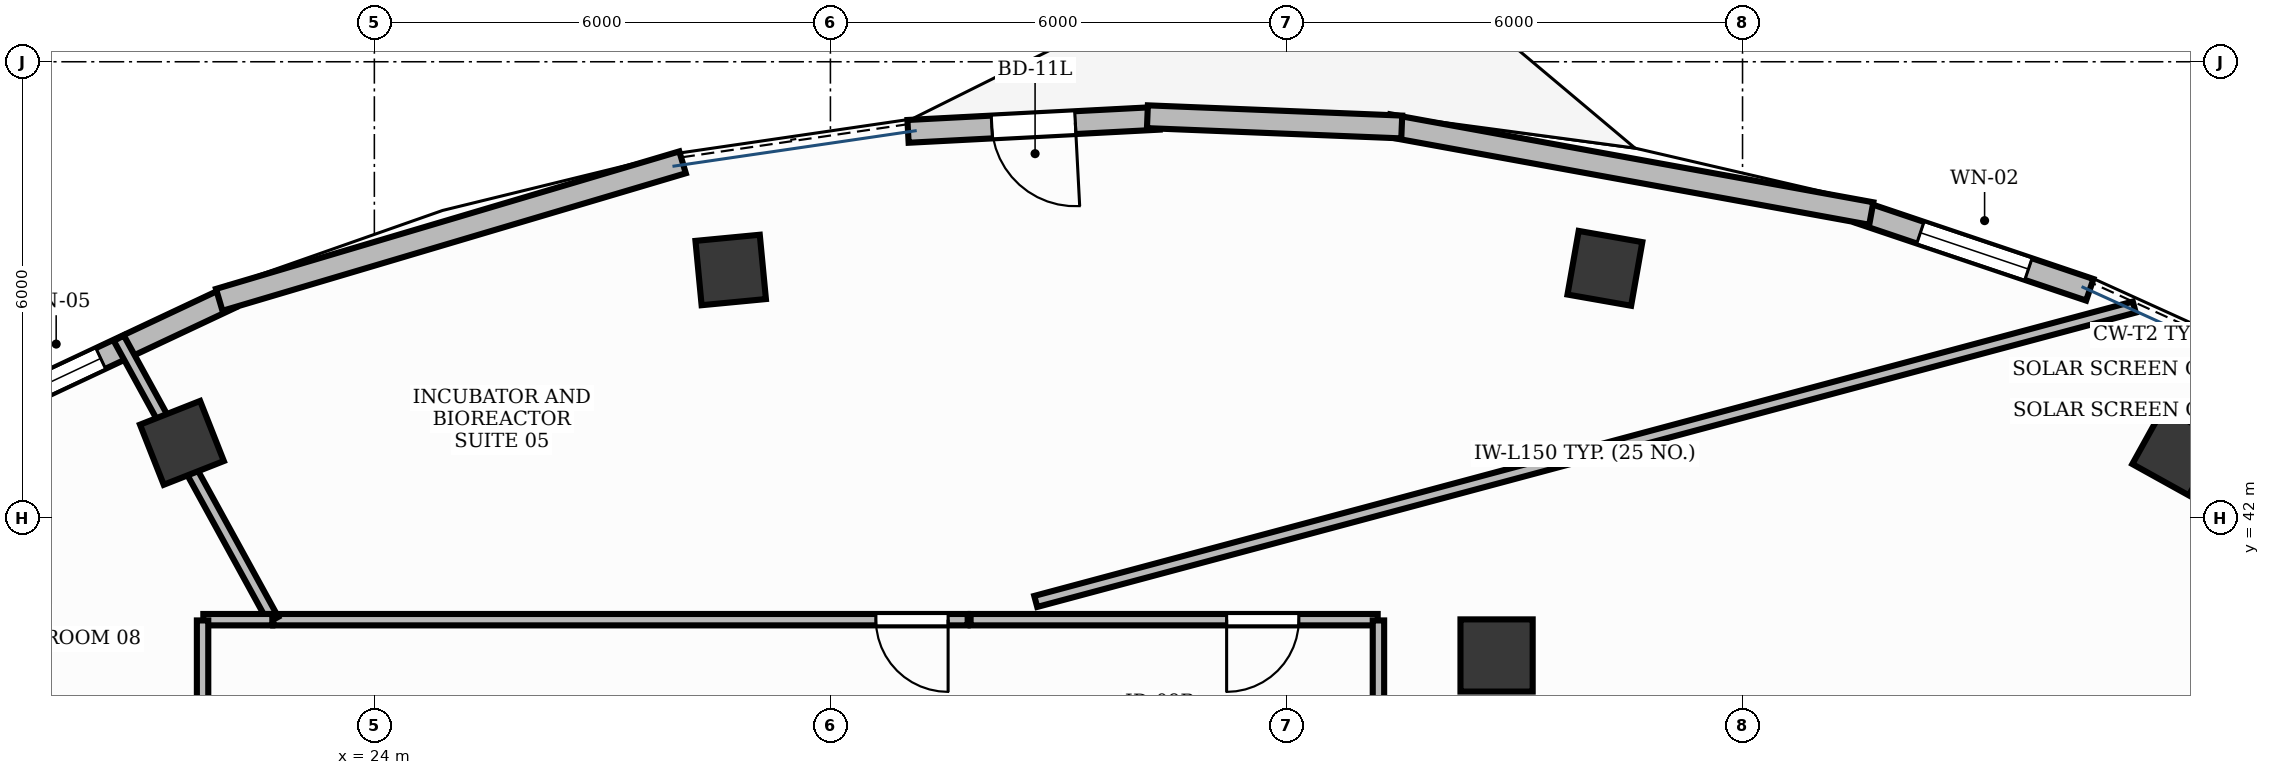
"""IFC4 building model, lengths in metres.
Left out: names, types, materials, properties, quantities, classifications, styles, units other than length and angle.
Written with IfcOpenShell. Run it as: python <this file> out.ifc"""

import sys

from ifc_helpers import new_model, si_unit, direction, frame, frame_2d, origin, origin_2d, place, context, subcontext, project, spatial, rectangle, extrude, element, fill, save


model = new_model("IFC4")
c1 = context("Model", 3, precision=1e-05, world=origin(), true_north=direction((0.0, 1.0)))
c2 = subcontext(c1, "Body", "Model", "MODEL_VIEW")
j1 = project(units=[si_unit("LENGTHUNIT", "METRE"), si_unit("PLANEANGLEUNIT", "RADIAN")], contexts=[c1])
p1 = place(None, origin())
s1 = spatial("IfcSite", under=j1, at=p1, CompositionType="ELEMENT")
p2 = place(p1, origin())
s2 = spatial("IfcBuilding", under=s1, at=p2, CompositionType="ELEMENT")
p3 = place(p2, frame((0.0, 0.0, 268.8)))
s3 = spatial("IfcBuildingStorey", under=s2, at=p3, CompositionType="ELEMENT", Elevation=268.8)
for number, where, z_axis, x_axis in (
    (1, (47.706, 42.873, -0.0), (0.0, 0.0, 1.0), (-0.875, 0.485, 0.0)),
    (2, (40.189, 45.282, -0.0), (0.0, 0.0, 1.0), (-0.985, 0.173, 0.0)),
):
    element("IfcColumn", number, at=place(p3, frame(where, z_axis=z_axis, x_axis=x_axis)), inside=s3, PredefinedType="COLUMN", context=c2, shape_type="SweptSolid", body=[
        extrude(rectangle(XDim=0.85, YDim=0.85, at=origin_2d()), origin(), (0.0, 0.0, 1.0), 3.901),
    ])
p4 = place(p3, frame((38.764, 40.189, -0.0), z_axis=(0.0, 0.0, 1.0), x_axis=(1.0, 0.0, 0.0)))
e3 = element("IfcColumn", 3, at=p4, inside=s3, PredefinedType="COLUMN", context=c2, shape_type="SweptSolid", body=[
    extrude(rectangle(XDim=0.95, YDim=0.95, at=origin_2d()), origin(), (0.0, 0.0, 1.0), 3.901),
])
for number, where, z_axis, x_axis in (
    (4, (28.688, 45.261, -0.0), (0.0, 0.0, 1.0), (0.995, 0.095, 0.0)),
    (5, (21.469, 42.986, -0.0), (0.0, 0.0, 1.0), (0.93, 0.367, 0.0)),
):
    element("IfcColumn", number, at=place(p3, frame(where, z_axis=z_axis, x_axis=x_axis)), inside=s3, PredefinedType="COLUMN", context=c2, shape_type="SweptSolid", body=[
        extrude(rectangle(XDim=0.85, YDim=0.85, at=origin_2d()), origin(), (0.0, 0.0, 1.0), 3.901),
    ])
p5 = place(p3, frame((46.569, 45.0, 0.0), z_axis=(0.0, 0.0, 1.0), x_axis=(-0.947657235502, 0.319289467413, 0.0)))
e6 = element("IfcWall", 6, at=p5, inside=s3, PredefinedType="STANDARD", context=c2, shape_type="SweptSolid", body=[
    extrude(rectangle(XDim=3.204, YDim=0.3, at=frame_2d((1.602, 0.0))), origin(), (0.0, 0.0, 1.0), 3.9),
])
p6 = place(p5, frame((0.852, 0.0, 0.95)))
e7 = element("IfcOpeningElement", 7, at=p6, cuts=e6, PredefinedType="OPENING", context=c2, shape_type="SweptSolid", body=[
    extrude(rectangle(XDim=1.5, YDim=1.8, at=frame_2d((0.75, 0.9))), frame((0.0, 0.165, 0.0), z_axis=(0.0, -1.0, 0.0), x_axis=(1.0, 0.0, 0.0)), (0.0, 0.0, 1.0), 0.33),
])
p7 = place(p3, frame((34.324, 47.257, 0.0), z_axis=(0.0, 0.0, 1.0), x_axis=(-0.998637335207, -0.052186901914, 0.0)))
e8 = element("IfcWall", 8, at=p7, inside=s3, PredefinedType="STANDARD", context=c2, shape_type="SweptSolid", body=[
    extrude(rectangle(XDim=3.307, YDim=0.3, at=frame_2d((1.654, 0.0))), origin(), (0.0, 0.0, 1.0), 3.9),
])
p8 = place(p7, frame((1.104, 0.0, 0.0)))
e9 = element("IfcOpeningElement", 9, at=p8, cuts=e8, PredefinedType="OPENING", context=c2, shape_type="SweptSolid", body=[
    extrude(rectangle(XDim=1.1, YDim=2.15, at=frame_2d((0.55, 1.075))), frame((0.0, 0.165, 0.0), z_axis=(0.0, -1.0, 0.0), x_axis=(1.0, 0.0, 0.0)), (0.0, 0.0, 1.0), 0.33),
])
p9 = place(p3, frame((22.118, 44.905, 0.0), z_axis=(0.0, 0.0, 1.0), x_axis=(-0.904969006582, -0.425477493089, 0.0)))
e10 = element("IfcWall", 10, at=p9, inside=s3, PredefinedType="STANDARD", context=c2, shape_type="SweptSolid", body=[
    extrude(rectangle(XDim=3.128, YDim=0.3, at=frame_2d((1.564, 0.0))), origin(), (0.0, 0.0, 1.0), 3.9),
])
p10 = place(p9, frame((1.899, 0.0, 0.95)))
e11 = element("IfcOpeningElement", 11, at=p10, cuts=e10, PredefinedType="OPENING", context=c2, shape_type="SweptSolid", body=[
    extrude(rectangle(XDim=0.9, YDim=1.8, at=frame_2d((0.45, 0.9))), frame((0.0, 0.165, 0.0), z_axis=(0.0, -1.0, 0.0), x_axis=(1.0, 0.0, 0.0)), (0.0, 0.0, 1.0), 0.33),
])
p11 = place(p3, frame((43.694, 46.004, 0.0), z_axis=(0.0, 0.0, 1.0), x_axis=(-0.983805148083, 0.179241263679, 0.0)))
e12 = element("IfcWall", 12, at=p11, inside=s3, PredefinedType="STANDARD", context=c2, shape_type="SweptSolid", body=[
    extrude(rectangle(XDim=6.46, YDim=0.3, at=frame_2d((3.23, 0.0))), origin(), (0.0, 0.0, 1.0), 3.9),
])
p12 = place(p3, frame((37.517, 47.142, 0.0), z_axis=(0.0, 0.0, 1.0), x_axis=(-0.999189974351, 0.040241709167, 0.0)))
e13 = element("IfcWall", 13, at=p12, inside=s3, PredefinedType="STANDARD", context=c2, shape_type="SweptSolid", body=[
    extrude(rectangle(XDim=3.349, YDim=0.3, at=frame_2d((1.674, 0.0))), origin(), (0.0, 0.0, 1.0), 3.9),
])
p13 = place(p3, frame((28.055, 46.677, 0.0), z_axis=(0.0, 0.0, 1.0), x_axis=(-0.958650794435, -0.284585056406, 0.0)))
e14 = element("IfcWall", 14, at=p13, inside=s3, PredefinedType="STANDARD", context=c2, shape_type="SweptSolid", body=[
    extrude(rectangle(XDim=6.359, YDim=0.3, at=frame_2d((3.179, 0.0))), origin(), (0.0, 0.0, 1.0), 3.47),
])
p14 = place(p3, frame((31.806, 40.66, 0.0), z_axis=(0.0, 0.0, 1.0), x_axis=(-1.0, 0.0, 0.0)))
e15 = element("IfcWall", 15, at=p14, inside=s3, PredefinedType="PARTITIONING", context=c2, shape_type="SweptSolid", body=[
    extrude(rectangle(XDim=9.136, YDim=0.15, at=frame_2d((4.568, 0.0))), origin(), (0.0, 0.0, 1.0), 2.91),
])
p15 = place(p14, frame((0.257, 0.0, 0.0)))
e16 = element("IfcOpeningElement", 16, at=p15, cuts=e15, PredefinedType="OPENING", context=c2, shape_type="SweptSolid", body=[
    extrude(rectangle(XDim=0.95, YDim=2.15, at=frame_2d((0.475, 1.075))), frame((0.0, 0.09, 0.0), z_axis=(0.0, -1.0, 0.0), x_axis=(1.0, 0.0, 0.0)), (0.0, 0.0, 1.0), 0.18),
])
p16 = place(p3, frame((37.2, 40.66, 0.0), z_axis=(0.0, 0.0, 1.0), x_axis=(-1.0, 0.0, 0.0)))
e17 = element("IfcWall", 17, at=p16, inside=s3, PredefinedType="PARTITIONING", context=c2, shape_type="SweptSolid", body=[
    extrude(rectangle(XDim=5.355, YDim=0.15, at=frame_2d((2.678, 0.0))), origin(), (0.0, 0.0, 1.0), 2.91),
])
p17 = place(p16, frame((1.037, 0.0, 0.0)))
e18 = element("IfcOpeningElement", 18, at=p17, cuts=e17, PredefinedType="OPENING", context=c2, shape_type="SweptSolid", body=[
    extrude(rectangle(XDim=0.95, YDim=2.15, at=frame_2d((0.475, 1.075))), frame((0.0, 0.09, 0.0), z_axis=(0.0, -1.0, 0.0), x_axis=(1.0, 0.0, 0.0)), (0.0, 0.0, 1.0), 0.18),
])
p18 = place(p3, frame((47.154, 44.772, 0.0), z_axis=(0.0, 0.0, 1.0), x_axis=(-0.965924962881, -0.258822267365, 0.0)))
e19 = element("IfcWall", 19, at=p18, inside=s3, PredefinedType="PARTITIONING", context=c2, shape_type="SweptSolid", body=[
    extrude(rectangle(XDim=14.962, YDim=0.15, at=frame_2d((7.481, 0.0))), origin(), (0.0, 0.0, 1.0), 2.91),
])
p19 = place(p3, frame((22.669, 40.66, 0.0), z_axis=(0.0, 0.0, 1.0), x_axis=(-0.480944413436, 0.8767510885, 0.0)))
e20 = element("IfcWall", 20, at=p19, inside=s3, PredefinedType="PARTITIONING", context=c2, shape_type="SweptSolid", body=[
    extrude(rectangle(XDim=4.224, YDim=0.15, at=frame_2d((2.112, 0.0))), origin(), (0.0, 0.0, 1.0), 2.91),
])
p20 = place(p3, frame((37.21, 38.1, 0.0), z_axis=(0.0, 0.0, 1.0), x_axis=(0.0, 1.0, 0.0)))
e21 = element("IfcWall", 21, at=p20, inside=s3, PredefinedType="PARTITIONING", context=c2, shape_type="SweptSolid", body=[
    extrude(rectangle(XDim=2.55, YDim=0.15, at=frame_2d((1.275, 0.0))), origin(), (0.0, 0.0, 1.0), 2.91),
])
p21 = place(p3, frame((22.658, 40.66, 0.0), z_axis=(0.0, 0.0, 1.0), x_axis=(-1.0, 0.0, 0.0)))
e22 = element("IfcWall", 22, at=p21, inside=s3, PredefinedType="PARTITIONING", context=c2, shape_type="SweptSolid", body=[
    extrude(rectangle(XDim=0.908, YDim=0.15, at=frame_2d((0.454, 0.0))), origin(), (0.0, 0.0, 1.0), 2.91),
])
p22 = place(p3, frame((21.74, 40.65, 0.0), z_axis=(0.0, 0.0, 1.0), x_axis=(0.0, -1.0, 0.0)))
e23 = element("IfcWall", 23, at=p22, inside=s3, PredefinedType="PARTITIONING", context=c2, shape_type="SweptSolid", body=[
    extrude(rectangle(XDim=5.85, YDim=0.15, at=frame_2d((2.925, 0.0))), origin(), (0.0, 0.0, 1.0), 2.91),
])
p23 = place(p6, origin())
e24 = element("IfcWindow", 24, at=p23, inside=s3, PartitioningType="DOUBLE_PANEL_VERTICAL", PredefinedType="WINDOW", context=c2, shape_type="SweptSolid", body=[
    extrude(rectangle(XDim=1.5, YDim=1.8, at=frame_2d((0.75, 0.9))), frame((0.0, 0.03, 0.0), z_axis=(0.0, -1.0, 0.0), x_axis=(1.0, 0.0, 0.0)), (0.0, 0.0, 1.0), 0.06),
])
fill(e7, e24)
p24 = place(p8, origin())
e25 = element("IfcDoor", 25, at=p24, inside=s3, OperationType="SINGLE_SWING_LEFT", PredefinedType="DOOR", context=c2, shape_type="SweptSolid", body=[
    extrude(rectangle(XDim=1.1, YDim=2.15, at=frame_2d((0.55, 1.075))), frame((0.0, 0.025, 0.0), z_axis=(0.0, -1.0, 0.0), x_axis=(1.0, 0.0, 0.0)), (0.0, 0.0, 1.0), 0.05),
])
fill(e9, e25)
p25 = place(p10, origin())
e26 = element("IfcWindow", 26, at=p25, inside=s3, PartitioningType="SINGLE_PANEL", PredefinedType="WINDOW", context=c2, shape_type="SweptSolid", body=[
    extrude(rectangle(XDim=0.9, YDim=1.8, at=frame_2d((0.45, 0.9))), frame((0.0, 0.03, 0.0), z_axis=(0.0, -1.0, 0.0), x_axis=(1.0, 0.0, 0.0)), (0.0, 0.0, 1.0), 0.06),
])
fill(e11, e26)
p26 = place(p15, origin())
e27 = element("IfcDoor", 27, at=p26, inside=s3, OperationType="SINGLE_SWING_LEFT", PredefinedType="DOOR", context=c2, shape_type="SweptSolid", body=[
    extrude(rectangle(XDim=0.95, YDim=2.15, at=frame_2d((0.475, 1.075))), frame((0.0, 0.025, 0.0), z_axis=(0.0, -1.0, 0.0), x_axis=(1.0, 0.0, 0.0)), (0.0, 0.0, 1.0), 0.05),
])
fill(e16, e27)
p27 = place(p17, origin())
e28 = element("IfcDoor", 28, at=p27, inside=s3, OperationType="SINGLE_SWING_RIGHT", PredefinedType="DOOR", context=c2, shape_type="SweptSolid", body=[
    extrude(rectangle(XDim=0.95, YDim=2.15, at=frame_2d((0.475, 1.075))), frame((0.0, 0.025, 0.0), z_axis=(0.0, -1.0, 0.0), x_axis=(1.0, 0.0, 0.0)), (0.0, 0.0, 1.0), 0.05),
])
fill(e18, e28)
save(model, sys.argv[1])
